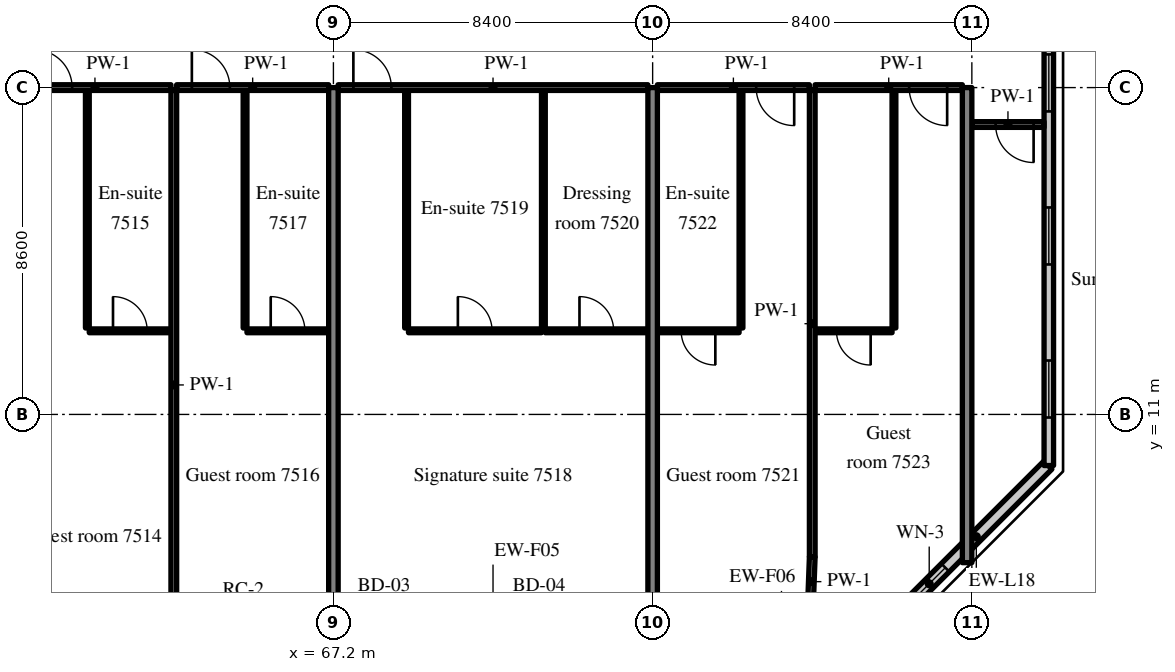
"""IFC4 building model, lengths in metres.
Left out: names, types, materials, properties, quantities, classifications, styles, units other than length and angle.
Written with IfcOpenShell. Run it as: python <this file> out.ifc"""

import sys

from ifc_helpers import new_model, si_unit, direction, frame, frame_2d, origin, place, context, subcontext, project, spatial, rectangle, extrude, source, transform, mapped, element, fill, save


model = new_model("IFC4")
c1 = context("Model", 3, precision=1e-05, world=origin(), true_north=direction((0.0, 1.0)))
c2 = subcontext(c1, "Body", "Model", "MODEL_VIEW")
j1 = project(units=[si_unit("LENGTHUNIT", "METRE"), si_unit("PLANEANGLEUNIT", "RADIAN")], contexts=[c1])
p1 = place(None, origin())
s1 = spatial("IfcSite", under=j1, at=p1, CompositionType="ELEMENT")
p2 = place(p1, origin())
s2 = spatial("IfcBuilding", under=s1, at=p2, CompositionType="ELEMENT")
p3 = place(p2, frame((0.0, 0.0, 313.7)))
s3 = spatial("IfcBuildingStorey", under=s2, at=p3, CompositionType="ELEMENT", Elevation=313.7)
m1 = source(origin(), c2, "Body", "SweptSolid", [
    extrude(rectangle(XDim=14.1, YDim=0.25, at=frame_2d((7.05, 0.0))), origin(), (0.0, 0.0, 1.0), 3.72),
])
for number, where, z_axis, x_axis in (
    (1, (67.2, 5.5, 0.0), (0.0, 0.0, 1.0), (0.0, 1.0, 0.0)),
    (2, (75.6, 5.5, 0.0), (0.0, 0.0, 1.0), (0.0, 1.0, 0.0)),
):
    element("IfcWall", number, at=place(p3, frame(where, z_axis=z_axis, x_axis=x_axis)), inside=s3, PredefinedType="SHEAR", context=c2, shape_type="MappedRepresentation", body=[
        mapped(m1, transform((0.0, 0.0, 0.0), scale=1.0)),
    ])
m2 = source(origin(), c2, "Body", "SweptSolid", [
    extrude(rectangle(XDim=12.5, YDim=0.25, at=frame_2d((6.25, 0.0))), origin(), (0.0, 0.0, 1.0), 3.72),
])
p4 = place(p3, frame((83.875, 7.1, 0.0), z_axis=(0.0, 0.0, 1.0), x_axis=(0.0, 1.0, 0.0)))
e3 = element("IfcWall", 3, at=p4, inside=s3, PredefinedType="SHEAR", context=c2, shape_type="MappedRepresentation", body=[
    mapped(m2, transform((0.0, 0.0, 0.0), scale=1.0)),
])
m3 = source(origin(), c2, "Body", "SweptSolid", [
    extrude(rectangle(XDim=5.326, YDim=0.3, at=frame_2d((2.663, 0.0))), origin(), (0.0, 0.0, 1.0), 3.72),
])
p5 = place(p3, frame((82.234, 5.9, 0.0), z_axis=(0.0, 0.0, 1.0), x_axis=(0.707083859269, 0.707129702361, 0.0)))
e4 = element("IfcWall", 4, at=p5, inside=s3, PredefinedType="SOLIDWALL", context=c2, shape_type="MappedRepresentation", body=[
    mapped(m3, transform((0.0, 0.0, 0.0), scale=1.0)),
])
m4 = source(origin(), c2, "Body", "SweptSolid", [
    extrude(rectangle(XDim=1.2, YDim=1.5, at=frame_2d((0.6, 0.75))), frame((0.0, 0.16, 0.0), z_axis=(0.0, -1.0, 0.0), x_axis=(1.0, 0.0, 0.0)), (0.0, 0.0, 1.0), 0.32),
])
p6 = place(p5, frame((0.31, 0.0, 0.9)))
e5 = element("IfcOpeningElement", 5, at=p6, cuts=e4, PredefinedType="OPENING", context=c2, shape_type="MappedRepresentation", body=[
    mapped(m4, transform((0.0, 0.0, 0.0), scale=1.0)),
])
m5 = source(origin(), c2, "Body", "SweptSolid", [
    extrude(rectangle(XDim=28.189, YDim=0.25, at=frame_2d((14.095, 0.0))), origin(), (0.0, 0.0, 1.0), 3.72),
])
p7 = place(p3, frame((86.025, 9.655, 0.0), z_axis=(0.0, 0.0, 1.0), x_axis=(0.0, 1.0, 0.0)))
e6 = element("IfcWall", 6, at=p7, inside=s3, PredefinedType="SOLIDWALL", context=c2, shape_type="MappedRepresentation", body=[
    mapped(m5, transform((0.0, 0.0, 0.0), scale=1.0)),
])
m6 = source(origin(), c2, "Body", "SweptSolid", [
    extrude(rectangle(XDim=1.5, YDim=1.5, at=frame_2d((0.75, 0.75))), frame((0.0, 0.135, 0.0), z_axis=(0.0, -1.0, 0.0), x_axis=(1.0, 0.0, 0.0)), (0.0, 0.0, 1.0), 0.27),
])
p8 = place(p7, frame((1.263, 0.0, 0.9)))
e7 = element("IfcOpeningElement", 7, at=p8, cuts=e6, PredefinedType="OPENING", context=c2, shape_type="MappedRepresentation", body=[
    mapped(m6, transform((0.0, 0.0, 0.0), scale=1.0)),
])
p9 = place(p7, frame((5.291, 0.0, 0.9)))
e8 = element("IfcOpeningElement", 8, at=p9, cuts=e6, PredefinedType="OPENING", context=c2, shape_type="MappedRepresentation", body=[
    mapped(m6, transform((0.0, 0.0, 0.0), scale=1.0)),
])
p10 = place(p7, frame((9.318, 0.0, 0.9)))
e9 = element("IfcOpeningElement", 9, at=p10, cuts=e6, PredefinedType="OPENING", context=c2, shape_type="MappedRepresentation", body=[
    mapped(m6, transform((0.0, 0.0, 0.0), scale=1.0)),
])
p11 = place(p7, frame((13.345, 0.0, 0.9)))
e10 = element("IfcOpeningElement", 10, at=p11, cuts=e6, PredefinedType="OPENING", context=c2, shape_type="MappedRepresentation", body=[
    mapped(m6, transform((0.0, 0.0, 0.0), scale=1.0)),
])
p12 = place(p7, frame((17.372, 0.0, 0.9)))
e11 = element("IfcOpeningElement", 11, at=p12, cuts=e6, PredefinedType="OPENING", context=c2, shape_type="MappedRepresentation", body=[
    mapped(m6, transform((0.0, 0.0, 0.0), scale=1.0)),
])
p13 = place(p7, frame((21.399, 0.0, 0.9)))
e12 = element("IfcOpeningElement", 12, at=p13, cuts=e6, PredefinedType="OPENING", context=c2, shape_type="MappedRepresentation", body=[
    mapped(m6, transform((0.0, 0.0, 0.0), scale=1.0)),
])
p14 = place(p7, frame((25.426, 0.0, 0.9)))
e13 = element("IfcOpeningElement", 13, at=p14, cuts=e6, PredefinedType="OPENING", context=c2, shape_type="MappedRepresentation", body=[
    mapped(m6, transform((0.0, 0.0, 0.0), scale=1.0)),
])
m7 = source(origin(), c2, "Body", "SweptSolid", [
    extrude(rectangle(XDim=6.25, YDim=0.1, at=frame_2d((3.125, 0.0))), origin(), (0.0, 0.0, 1.0), 3.72),
])
p15 = place(p3, frame((60.725, 13.275, 0.0), z_axis=(0.0, 0.0, 1.0), x_axis=(0.0, 1.0, 0.0)))
e14 = element("IfcWall", 14, at=p15, inside=s3, PredefinedType="PARTITIONING", context=c2, shape_type="MappedRepresentation", body=[
    mapped(m7, transform((0.0, 0.0, 0.0), scale=1.0)),
])
m8 = source(origin(), c2, "Body", "SweptSolid", [
    extrude(rectangle(XDim=2.15, YDim=0.1, at=frame_2d((1.075, 0.0))), origin(), (0.0, 0.0, 1.0), 3.72),
])
p16 = place(p3, frame((60.775, 13.2, 0.0), z_axis=(0.0, 0.0, 1.0), x_axis=(1.0, 0.0, 0.0)))
e15 = element("IfcWall", 15, at=p16, inside=s3, PredefinedType="PARTITIONING", context=c2, shape_type="MappedRepresentation", body=[
    mapped(m8, transform((0.0, 0.0, 0.0), scale=1.0)),
])
m9 = source(origin(), c2, "Body", "SweptSolid", [
    extrude(rectangle(XDim=0.9, YDim=2.1, at=frame_2d((0.45, 1.05))), frame((0.0, 0.06, 0.0), z_axis=(0.0, -1.0, 0.0), x_axis=(1.0, 0.0, 0.0)), (0.0, 0.0, 1.0), 0.12),
])
p17 = place(p16, frame((0.625, 0.0, 0.0)))
e16 = element("IfcOpeningElement", 16, at=p17, cuts=e15, PredefinedType="OPENING", context=c2, shape_type="MappedRepresentation", body=[
    mapped(m9, transform((0.0, 0.0, 0.0), scale=1.0)),
])
m10 = source(origin(), c2, "Body", "SweptSolid", [
    extrude(rectangle(XDim=4.0, YDim=0.15, at=frame_2d((2.0, 0.0))), origin(), (0.0, 0.0, 1.0), 3.02),
])
p18 = place(p3, frame((58.925, 19.6, 0.0), z_axis=(0.0, 0.0, 1.0), x_axis=(1.0, 0.0, 0.0)))
e17 = element("IfcWall", 17, at=p18, inside=s3, PredefinedType="PARTITIONING", context=c2, shape_type="MappedRepresentation", body=[
    mapped(m10, transform((0.0, 0.0, 0.0), scale=1.0)),
])
m11 = source(origin(), c2, "Body", "SweptSolid", [
    extrude(rectangle(XDim=1.0, YDim=2.1, at=frame_2d((0.5, 1.05))), frame((0.0, 0.085, 0.0), z_axis=(0.0, -1.0, 0.0), x_axis=(1.0, 0.0, 0.0)), (0.0, 0.0, 1.0), 0.17),
])
p19 = place(p18, frame((0.4, 0.0, 0.0)))
e18 = element("IfcOpeningElement", 18, at=p19, cuts=e17, PredefinedType="OPENING", context=c2, shape_type="MappedRepresentation", body=[
    mapped(m11, transform((0.0, 0.0, 0.0), scale=1.0)),
])
p20 = place(p3, frame((64.875, 13.275, 0.0), z_axis=(0.0, 0.0, 1.0), x_axis=(0.0, 1.0, 0.0)))
e19 = element("IfcWall", 19, at=p20, inside=s3, PredefinedType="PARTITIONING", context=c2, shape_type="MappedRepresentation", body=[
    mapped(m7, transform((0.0, 0.0, 0.0), scale=1.0)),
])
m12 = source(origin(), c2, "Body", "SweptSolid", [
    extrude(rectangle(XDim=2.15, YDim=0.1, at=frame_2d((1.075, 0.0))), origin(), (0.0, 0.0, 1.0), 3.72),
])
p21 = place(p3, frame((64.925, 13.2, 0.0), z_axis=(0.0, 0.0, 1.0), x_axis=(1.0, 0.0, 0.0)))
e20 = element("IfcWall", 20, at=p21, inside=s3, PredefinedType="PARTITIONING", context=c2, shape_type="MappedRepresentation", body=[
    mapped(m12, transform((0.0, 0.0, 0.0), scale=1.0)),
])
p22 = place(p21, frame((0.625, 0.0, 0.0)))
e21 = element("IfcOpeningElement", 21, at=p22, cuts=e20, PredefinedType="OPENING", context=c2, shape_type="MappedRepresentation", body=[
    mapped(m9, transform((0.0, 0.0, 0.0), scale=1.0)),
])
p23 = place(p3, frame((63.075, 19.6, 0.0), z_axis=(0.0, 0.0, 1.0), x_axis=(1.0, 0.0, 0.0)))
e22 = element("IfcWall", 22, at=p23, inside=s3, PredefinedType="PARTITIONING", context=c2, shape_type="MappedRepresentation", body=[
    mapped(m10, transform((0.0, 0.0, 0.0), scale=1.0)),
])
p24 = place(p23, frame((0.4, 0.0, 0.0)))
e23 = element("IfcOpeningElement", 23, at=p24, cuts=e22, PredefinedType="OPENING", context=c2, shape_type="MappedRepresentation", body=[
    mapped(m11, transform((0.0, 0.0, 0.0), scale=1.0)),
])
m13 = source(origin(), c2, "Body", "SweptSolid", [
    extrude(rectangle(XDim=15.498, YDim=0.15, at=frame_2d((7.749, 0.0))), origin(), (0.0, 0.0, 1.0), 3.72),
])
p25 = place(p3, frame((63.0, 4.027, 0.0), z_axis=(0.0, 0.0, 1.0), x_axis=(0.0, 1.0, 0.0)))
e24 = element("IfcWall", 24, at=p25, inside=s3, PredefinedType="PARTITIONING", context=c2, shape_type="MappedRepresentation", body=[
    mapped(m13, transform((0.0, 0.0, 0.0), scale=1.0)),
])
for number, where, z_axis, x_axis in (
    (25, (69.125, 13.275, 0.0), (0.0, 0.0, 1.0), (0.0, 1.0, 0.0)),
    (26, (72.725, 13.275, 0.0), (0.0, 0.0, 1.0), (0.0, 1.0, 0.0)),
):
    element("IfcWall", number, at=place(p3, frame(where, z_axis=z_axis, x_axis=x_axis)), inside=s3, PredefinedType="PARTITIONING", context=c2, shape_type="MappedRepresentation", body=[
        mapped(m7, transform((0.0, 0.0, 0.0), scale=1.0)),
    ])
m14 = source(origin(), c2, "Body", "SweptSolid", [
    extrude(rectangle(XDim=3.5, YDim=0.1, at=frame_2d((1.75, 0.0))), origin(), (0.0, 0.0, 1.0), 3.72),
])
p26 = place(p3, frame((69.175, 13.2, 0.0), z_axis=(0.0, 0.0, 1.0), x_axis=(1.0, 0.0, 0.0)))
e27 = element("IfcWall", 27, at=p26, inside=s3, PredefinedType="PARTITIONING", context=c2, shape_type="MappedRepresentation", body=[
    mapped(m14, transform((0.0, 0.0, 0.0), scale=1.0)),
])
p27 = place(p26, frame((1.3, 0.0, 0.0)))
e28 = element("IfcOpeningElement", 28, at=p27, cuts=e27, PredefinedType="OPENING", context=c2, shape_type="MappedRepresentation", body=[
    mapped(m9, transform((0.0, 0.0, 0.0), scale=1.0)),
])
m15 = source(origin(), c2, "Body", "SweptSolid", [
    extrude(rectangle(XDim=2.7, YDim=0.1, at=frame_2d((1.35, 0.0))), origin(), (0.0, 0.0, 1.0), 3.72),
])
p28 = place(p3, frame((72.775, 13.2, 0.0), z_axis=(0.0, 0.0, 1.0), x_axis=(1.0, 0.0, 0.0)))
e29 = element("IfcWall", 29, at=p28, inside=s3, PredefinedType="PARTITIONING", context=c2, shape_type="MappedRepresentation", body=[
    mapped(m15, transform((0.0, 0.0, 0.0), scale=1.0)),
])
p29 = place(p28, frame((0.9, 0.0, 0.0)))
e30 = element("IfcOpeningElement", 30, at=p29, cuts=e29, PredefinedType="OPENING", context=c2, shape_type="MappedRepresentation", body=[
    mapped(m9, transform((0.0, 0.0, 0.0), scale=1.0)),
])
m16 = source(origin(), c2, "Body", "SweptSolid", [
    extrude(rectangle(XDim=8.15, YDim=0.15, at=frame_2d((4.075, 0.0))), origin(), (0.0, 0.0, 1.0), 3.02),
])
p30 = place(p3, frame((67.325, 19.6, 0.0), z_axis=(0.0, 0.0, 1.0), x_axis=(1.0, 0.0, 0.0)))
e31 = element("IfcWall", 31, at=p30, inside=s3, PredefinedType="PARTITIONING", context=c2, shape_type="MappedRepresentation", body=[
    mapped(m16, transform((0.0, 0.0, 0.0), scale=1.0)),
])
p31 = place(p30, frame((0.4, 0.0, 0.0)))
e32 = element("IfcOpeningElement", 32, at=p31, cuts=e31, PredefinedType="OPENING", context=c2, shape_type="MappedRepresentation", body=[
    mapped(m11, transform((0.0, 0.0, 0.0), scale=1.0)),
])
p32 = place(p3, frame((77.925, 13.275, 0.0), z_axis=(0.0, 0.0, 1.0), x_axis=(0.0, 1.0, 0.0)))
e33 = element("IfcWall", 33, at=p32, inside=s3, PredefinedType="PARTITIONING", context=c2, shape_type="MappedRepresentation", body=[
    mapped(m7, transform((0.0, 0.0, 0.0), scale=1.0)),
])
p33 = place(p3, frame((75.725, 13.2, 0.0), z_axis=(0.0, 0.0, 1.0), x_axis=(1.0, 0.0, 0.0)))
e34 = element("IfcWall", 34, at=p33, inside=s3, PredefinedType="PARTITIONING", context=c2, shape_type="MappedRepresentation", body=[
    mapped(m12, transform((0.0, 0.0, 0.0), scale=1.0)),
])
p34 = place(p33, frame((0.625, 0.0, 0.0)))
e35 = element("IfcOpeningElement", 35, at=p34, cuts=e34, PredefinedType="OPENING", context=c2, shape_type="MappedRepresentation", body=[
    mapped(m9, transform((0.0, 0.0, 0.0), scale=1.0)),
])
p35 = place(p3, frame((75.725, 19.6, 0.0), z_axis=(0.0, 0.0, 1.0), x_axis=(1.0, 0.0, 0.0)))
e36 = element("IfcWall", 36, at=p35, inside=s3, PredefinedType="PARTITIONING", context=c2, shape_type="MappedRepresentation", body=[
    mapped(m10, transform((0.0, 0.0, 0.0), scale=1.0)),
])
p36 = place(p35, frame((2.6, 0.0, 0.0)))
e37 = element("IfcOpeningElement", 37, at=p36, cuts=e36, PredefinedType="OPENING", context=c2, shape_type="MappedRepresentation", body=[
    mapped(m11, transform((0.0, 0.0, 0.0), scale=1.0)),
])
p37 = place(p3, frame((81.95, 13.275, 0.0), z_axis=(0.0, 0.0, 1.0), x_axis=(0.0, 1.0, 0.0)))
e38 = element("IfcWall", 38, at=p37, inside=s3, PredefinedType="PARTITIONING", context=c2, shape_type="MappedRepresentation", body=[
    mapped(m7, transform((0.0, 0.0, 0.0), scale=1.0)),
])
m17 = source(origin(), c2, "Body", "SweptSolid", [
    extrude(rectangle(XDim=2.025, YDim=0.1, at=frame_2d((1.012, 0.0))), origin(), (0.0, 0.0, 1.0), 3.72),
])
p38 = place(p3, frame((79.875, 13.2, 0.0), z_axis=(0.0, 0.0, 1.0), x_axis=(1.0, 0.0, 0.0)))
e39 = element("IfcWall", 39, at=p38, inside=s3, PredefinedType="PARTITIONING", context=c2, shape_type="MappedRepresentation", body=[
    mapped(m17, transform((0.0, 0.0, 0.0), scale=1.0)),
])
p39 = place(p38, frame((0.562, 0.0, 0.0)))
e40 = element("IfcOpeningElement", 40, at=p39, cuts=e39, PredefinedType="OPENING", context=c2, shape_type="MappedRepresentation", body=[
    mapped(m9, transform((0.0, 0.0, 0.0), scale=1.0)),
])
m18 = source(origin(), c2, "Body", "SweptSolid", [
    extrude(rectangle(XDim=3.875, YDim=0.15, at=frame_2d((1.938, 0.0))), origin(), (0.0, 0.0, 1.0), 3.02),
])
p40 = place(p3, frame((79.875, 19.6, 0.0), z_axis=(0.0, 0.0, 1.0), x_axis=(1.0, 0.0, 0.0)))
e41 = element("IfcWall", 41, at=p40, inside=s3, PredefinedType="PARTITIONING", context=c2, shape_type="MappedRepresentation", body=[
    mapped(m18, transform((0.0, 0.0, 0.0), scale=1.0)),
])
p41 = place(p40, frame((2.475, 0.0, 0.0)))
e42 = element("IfcOpeningElement", 42, at=p41, cuts=e41, PredefinedType="OPENING", context=c2, shape_type="MappedRepresentation", body=[
    mapped(m11, transform((0.0, 0.0, 0.0), scale=1.0)),
])
m19 = source(origin(), c2, "Body", "SweptSolid", [
    extrude(rectangle(XDim=12.275, YDim=0.15, at=frame_2d((6.137, 0.0))), origin(), (0.0, 0.0, 1.0), 3.72),
])
p42 = place(p3, frame((79.8, 7.25, 0.0), z_axis=(0.0, 0.0, 1.0), x_axis=(0.0, 1.0, 0.0)))
e43 = element("IfcWall", 43, at=p42, inside=s3, PredefinedType="PARTITIONING", context=c2, shape_type="MappedRepresentation", body=[
    mapped(m19, transform((0.0, 0.0, 0.0), scale=1.0)),
])
m20 = source(origin(), c2, "Body", "SweptSolid", [
    extrude(rectangle(XDim=1.9, YDim=0.15, at=frame_2d((0.95, 0.0))), origin(), (0.0, 0.0, 1.0), 3.02),
])
p43 = place(p3, frame((84.0, 18.628, 0.0), z_axis=(0.0, 0.0, 1.0), x_axis=(1.0, 0.0, 0.0)))
e44 = element("IfcWall", 44, at=p43, inside=s3, PredefinedType="PARTITIONING", context=c2, shape_type="MappedRepresentation", body=[
    mapped(m20, transform((0.0, 0.0, 0.0), scale=1.0)),
])
p44 = place(p43, frame((0.625, 0.0, 0.0)))
e45 = element("IfcOpeningElement", 45, at=p44, cuts=e44, PredefinedType="OPENING", context=c2, shape_type="MappedRepresentation", body=[
    mapped(m11, transform((0.0, 0.0, 0.0), scale=1.0)),
])
m21 = source(origin(), c2, "Body", "SweptSolid", [
    extrude(rectangle(XDim=1.301, YDim=0.15, at=frame_2d((0.65, 0.0))), origin(), (0.0, 0.0, 1.0), 3.72),
])
p45 = place(p3, frame((79.752, 5.95, 0.0), z_axis=(0.0, 0.0, 1.0), x_axis=(0.036970014262, 0.999316375351, 0.0)))
e46 = element("IfcWall", 46, at=p45, inside=s3, PredefinedType="PARTITIONING", context=c2, shape_type="MappedRepresentation", body=[
    mapped(m21, transform((0.0, 0.0, 0.0), scale=1.0)),
])
m22 = source(origin(), c2, "Body", "SweptSolid", [
    extrude(rectangle(XDim=1.2, YDim=1.5, at=frame_2d((0.6, 0.75))), frame((0.0, 0.03, 0.0), z_axis=(0.0, -1.0, 0.0), x_axis=(1.0, 0.0, 0.0)), (0.0, 0.0, 1.0), 0.06),
])
p46 = place(p6, origin())
e47 = element("IfcWindow", 47, at=p46, inside=s3, PartitioningType="SINGLE_PANEL", PredefinedType="WINDOW", context=c2, shape_type="MappedRepresentation", body=[
    mapped(m22, transform((0.0, 0.0, 0.0), scale=1.0)),
])
fill(e5, e47)
m23 = source(origin(), c2, "Body", "SweptSolid", [
    extrude(rectangle(XDim=1.5, YDim=1.5, at=frame_2d((0.75, 0.75))), frame((0.0, 0.03, 0.0), z_axis=(0.0, -1.0, 0.0), x_axis=(1.0, 0.0, 0.0)), (0.0, 0.0, 1.0), 0.06),
])
p47 = place(p8, origin())
e48 = element("IfcWindow", 48, at=p47, inside=s3, PartitioningType="SINGLE_PANEL", PredefinedType="WINDOW", context=c2, shape_type="MappedRepresentation", body=[
    mapped(m23, transform((0.0, 0.0, 0.0), scale=1.0)),
])
fill(e7, e48)
p48 = place(p9, origin())
e49 = element("IfcWindow", 49, at=p48, inside=s3, PartitioningType="SINGLE_PANEL", PredefinedType="WINDOW", context=c2, shape_type="MappedRepresentation", body=[
    mapped(m23, transform((0.0, 0.0, 0.0), scale=1.0)),
])
fill(e8, e49)
p49 = place(p10, origin())
e50 = element("IfcWindow", 50, at=p49, inside=s3, PartitioningType="SINGLE_PANEL", PredefinedType="WINDOW", context=c2, shape_type="MappedRepresentation", body=[
    mapped(m23, transform((0.0, 0.0, 0.0), scale=1.0)),
])
fill(e9, e50)
m24 = source(origin(), c2, "Body", "SweptSolid", [
    extrude(rectangle(XDim=0.9, YDim=2.1, at=frame_2d((0.45, 1.05))), frame((0.0, 0.025, 0.0), z_axis=(0.0, -1.0, 0.0), x_axis=(1.0, 0.0, 0.0)), (0.0, 0.0, 1.0), 0.05),
])
p50 = place(p17, origin())
e51 = element("IfcDoor", 51, at=p50, inside=s3, OperationType="SINGLE_SWING_LEFT", PredefinedType="DOOR", context=c2, shape_type="MappedRepresentation", body=[
    mapped(m24, transform((0.0, 0.0, 0.0), scale=1.0)),
])
fill(e16, e51)
m25 = source(origin(), c2, "Body", "SweptSolid", [
    extrude(rectangle(XDim=1.0, YDim=2.1, at=frame_2d((0.5, 1.05))), frame((0.0, 0.025, 0.0), z_axis=(0.0, -1.0, 0.0), x_axis=(1.0, 0.0, 0.0)), (0.0, 0.0, 1.0), 0.05),
])
p51 = place(p19, origin())
e52 = element("IfcDoor", 52, at=p51, inside=s3, OperationType="SINGLE_SWING_LEFT", PredefinedType="DOOR", context=c2, shape_type="MappedRepresentation", body=[
    mapped(m25, transform((0.0, 0.0, 0.0), scale=1.0)),
])
fill(e18, e52)
p52 = place(p22, origin())
e53 = element("IfcDoor", 53, at=p52, inside=s3, OperationType="SINGLE_SWING_LEFT", PredefinedType="DOOR", context=c2, shape_type="MappedRepresentation", body=[
    mapped(m24, transform((0.0, 0.0, 0.0), scale=1.0)),
])
fill(e21, e53)
p53 = place(p24, origin())
e54 = element("IfcDoor", 54, at=p53, inside=s3, OperationType="SINGLE_SWING_LEFT", PredefinedType="DOOR", context=c2, shape_type="MappedRepresentation", body=[
    mapped(m25, transform((0.0, 0.0, 0.0), scale=1.0)),
])
fill(e23, e54)
p54 = place(p27, origin())
e55 = element("IfcDoor", 55, at=p54, inside=s3, OperationType="SINGLE_SWING_LEFT", PredefinedType="DOOR", context=c2, shape_type="MappedRepresentation", body=[
    mapped(m24, transform((0.0, 0.0, 0.0), scale=1.0)),
])
fill(e28, e55)
p55 = place(p29, origin())
e56 = element("IfcDoor", 56, at=p55, inside=s3, OperationType="SINGLE_SWING_LEFT", PredefinedType="DOOR", context=c2, shape_type="MappedRepresentation", body=[
    mapped(m24, transform((0.0, 0.0, 0.0), scale=1.0)),
])
fill(e30, e56)
p56 = place(p31, origin())
e57 = element("IfcDoor", 57, at=p56, inside=s3, OperationType="SINGLE_SWING_LEFT", PredefinedType="DOOR", context=c2, shape_type="MappedRepresentation", body=[
    mapped(m25, transform((0.0, 0.0, 0.0), scale=1.0)),
])
fill(e32, e57)
p57 = place(p34, origin())
e58 = element("IfcDoor", 58, at=p57, inside=s3, OperationType="SINGLE_SWING_RIGHT", PredefinedType="DOOR", context=c2, shape_type="MappedRepresentation", body=[
    mapped(m24, transform((0.0, 0.0, 0.0), scale=1.0)),
])
fill(e35, e58)
p58 = place(p36, origin())
e59 = element("IfcDoor", 59, at=p58, inside=s3, OperationType="SINGLE_SWING_RIGHT", PredefinedType="DOOR", context=c2, shape_type="MappedRepresentation", body=[
    mapped(m25, transform((0.0, 0.0, 0.0), scale=1.0)),
])
fill(e37, e59)
p59 = place(p39, origin())
e60 = element("IfcDoor", 60, at=p59, inside=s3, OperationType="SINGLE_SWING_RIGHT", PredefinedType="DOOR", context=c2, shape_type="MappedRepresentation", body=[
    mapped(m24, transform((0.0, 0.0, 0.0), scale=1.0)),
])
fill(e40, e60)
p60 = place(p41, origin())
e61 = element("IfcDoor", 61, at=p60, inside=s3, OperationType="SINGLE_SWING_RIGHT", PredefinedType="DOOR", context=c2, shape_type="MappedRepresentation", body=[
    mapped(m25, transform((0.0, 0.0, 0.0), scale=1.0)),
])
fill(e42, e61)
p61 = place(p44, origin())
e62 = element("IfcDoor", 62, at=p61, inside=s3, OperationType="SINGLE_SWING_RIGHT", PredefinedType="DOOR", context=c2, shape_type="MappedRepresentation", body=[
    mapped(m25, transform((0.0, 0.0, 0.0), scale=1.0)),
])
fill(e45, e62)
save(model, sys.argv[1])
